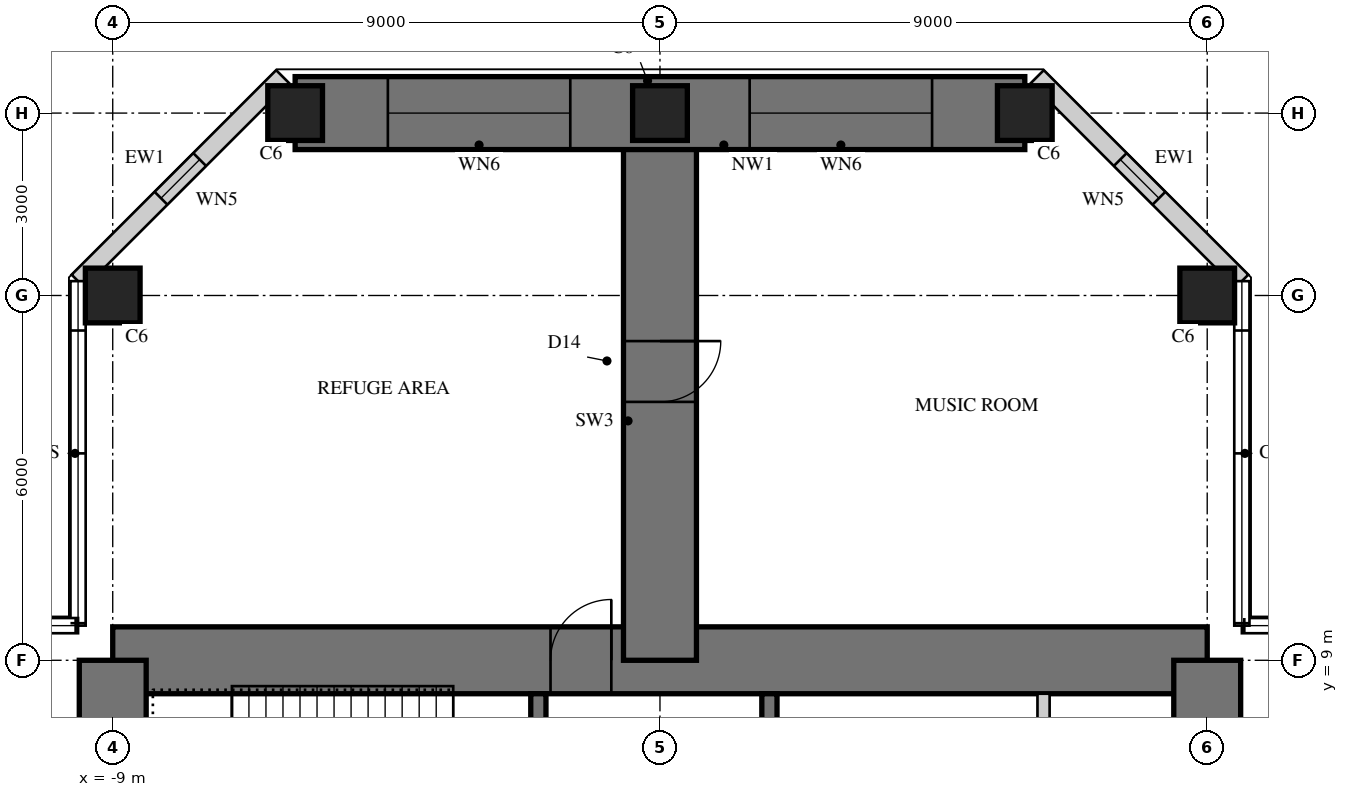
"""IFC4 building model, lengths in metres.
Left out: names, types, materials, properties, quantities, classifications, styles, units other than length and angle.
Written with IfcOpenShell. Run it as: python <this file> out.ifc"""

import sys

from ifc_helpers import new_model, si_unit, direction, frame, frame_2d, origin, origin_2d, place, context, subcontext, project, spatial, rectangle, hollow_rectangle, extrude, element, fill, save


model = new_model("IFC4")
c1 = context("Model", 3, precision=1e-05, world=origin(), true_north=direction((0.0, 1.0)))
c2 = subcontext(c1, "Body", "Model", "MODEL_VIEW")
j1 = project(units=[si_unit("LENGTHUNIT", "METRE"), si_unit("PLANEANGLEUNIT", "RADIAN")], contexts=[c1])
p1 = place(None, origin())
s1 = spatial("IfcSite", under=j1, at=p1, CompositionType="ELEMENT")
p2 = place(p1, origin())
s2 = spatial("IfcBuilding", under=s1, at=p2, CompositionType="ELEMENT")
p3 = place(p2, frame((0.0, 0.0, 217.1)))
s3 = spatial("IfcBuildingStorey", under=s2, at=p3, CompositionType="ELEMENT", Elevation=217.1)
p4 = place(p3, frame((9.0, 9.0, 0.0), z_axis=(0.0, 0.0, 1.0), x_axis=(-1.0, 0.0, 0.0)))
e1 = element("IfcWall", 1, at=p4, inside=s3, PredefinedType="SHEAR", context=c2, shape_type="SweptSolid", body=[
    extrude(rectangle(XDim=18.0, YDim=1.1, at=frame_2d((9.0, 0.0))), origin(), (0.0, 0.0, 1.0), 5.0),
])
p5 = place(p4, frame((9.8, 0.0, 0.0)))
e2 = element("IfcOpeningElement", 2, at=p5, cuts=e1, PredefinedType="OPENING", context=c2, shape_type="SweptSolid", body=[
    extrude(rectangle(XDim=1.0, YDim=2.4, at=frame_2d((0.5, 1.2))), frame((0.0, 0.56, 0.0), z_axis=(0.0, -1.0, 0.0), x_axis=(1.0, 0.0, 0.0)), (0.0, 0.0, 1.0), 1.12),
])
p6 = place(p3, frame((9.0, -9.0, 0.0), z_axis=(0.0, 0.0, 1.0), x_axis=(0.0, 1.0, 0.0)))
e3 = element("IfcWall", 3, at=p6, inside=s3, PredefinedType="SHEAR", context=c2, shape_type="SweptSolid", body=[
    extrude(rectangle(XDim=18.0, YDim=1.1, at=frame_2d((9.0, 0.0))), origin(), (0.0, 0.0, 1.0), 5.0),
])
p7 = place(p6, frame((9.8, 0.0, 0.0)))
e4 = element("IfcOpeningElement", 4, at=p7, cuts=e3, PredefinedType="OPENING", context=c2, shape_type="SweptSolid", body=[
    extrude(rectangle(XDim=1.0, YDim=2.4, at=frame_2d((0.5, 1.2))), frame((0.0, 0.56, 0.0), z_axis=(0.0, -1.0, 0.0), x_axis=(1.0, 0.0, 0.0)), (0.0, 0.0, 1.0), 1.12),
])
p8 = place(p3, frame((-9.0, 9.0, 0.0), z_axis=(0.0, 0.0, 1.0), x_axis=(0.0, -1.0, 0.0)))
e5 = element("IfcWall", 5, at=p8, inside=s3, PredefinedType="SHEAR", context=c2, shape_type="SweptSolid", body=[
    extrude(rectangle(XDim=18.0, YDim=1.1, at=frame_2d((9.0, 0.0))), origin(), (0.0, 0.0, 1.0), 5.0),
])
p9 = place(p8, frame((9.8, 0.0, 0.0)))
e6 = element("IfcOpeningElement", 6, at=p9, cuts=e5, PredefinedType="OPENING", context=c2, shape_type="SweptSolid", body=[
    extrude(rectangle(XDim=1.0, YDim=2.4, at=frame_2d((0.5, 1.2))), frame((0.0, 0.56, 0.0), z_axis=(0.0, -1.0, 0.0), x_axis=(1.0, 0.0, 0.0)), (0.0, 0.0, 1.0), 1.12),
])
p10 = place(p3, frame((1.8, 1.875, 0.0), z_axis=(0.0, 0.0, 1.0), x_axis=(0.0, 1.0, 0.0)))
e7 = element("IfcWall", 7, at=p10, inside=s3, PredefinedType="SHEAR", context=c2, shape_type="SweptSolid", body=[
    extrude(rectangle(XDim=6.575, YDim=0.25, at=frame_2d((3.288, 0.0))), origin(), (0.0, 0.0, 1.0), 5.0),
])
p11 = place(p10, frame((1.875, 0.0, 0.0)))
e8 = element("IfcOpeningElement", 8, at=p11, cuts=e7, PredefinedType="OPENING", context=c2, shape_type="SweptSolid", body=[
    extrude(rectangle(XDim=1.6, YDim=2.4, at=frame_2d((0.8, 1.2))), frame((0.0, 0.135, 0.0), z_axis=(0.0, -1.0, 0.0), x_axis=(1.0, 0.0, 0.0)), (0.0, 0.0, 1.0), 0.27),
])
p12 = place(p3, frame((6.308, 5.975, 0.0), z_axis=(0.0, 0.0, 1.0), x_axis=(0.0, 1.0, 0.0)))
e9 = element("IfcWall", 9, at=p12, inside=s3, PredefinedType="PARTITIONING", context=c2, shape_type="SweptSolid", body=[
    extrude(rectangle(XDim=2.475, YDim=0.2, at=frame_2d((1.237, 0.0))), origin(), (0.0, 0.0, 1.0), 5.0),
])
p13 = place(p3, frame((-2.0, 1.675, 0.0), z_axis=(0.0, 0.0, 1.0), x_axis=(0.0, 1.0, 0.0)))
e10 = element("IfcWall", 10, at=p13, inside=s3, PredefinedType="SHEAR", context=c2, shape_type="SweptSolid", body=[
    extrude(rectangle(XDim=6.775, YDim=0.25, at=frame_2d((3.387, 0.0))), origin(), (0.0, 0.0, 1.0), 5.0),
])
p14 = place(p13, frame((0.725, 0.0, 0.0)))
e11 = element("IfcOpeningElement", 11, at=p14, cuts=e10, PredefinedType="OPENING", context=c2, shape_type="SweptSolid", body=[
    extrude(rectangle(XDim=1.0, YDim=2.1, at=frame_2d((0.5, 1.05))), frame((0.0, 0.135, 0.0), z_axis=(0.0, -1.0, 0.0), x_axis=(1.0, 0.0, 0.0)), (0.0, 0.0, 1.0), 0.27),
])
p15 = place(p3, frame((0.0, 9.0, 0.0), z_axis=(0.0, 0.0, 1.0), x_axis=(0.0, 1.0, 0.0)))
e12 = element("IfcWall", 12, at=p15, inside=s3, PredefinedType="SHEAR", context=c2, shape_type="SweptSolid", body=[
    extrude(rectangle(XDim=9.0, YDim=1.2, at=frame_2d((4.5, 0.0))), origin(), (0.0, 0.0, 1.0), 5.0),
])
p16 = place(p15, frame((4.25, 0.0, 0.0)))
e13 = element("IfcOpeningElement", 13, at=p16, cuts=e12, PredefinedType="OPENING", context=c2, shape_type="SweptSolid", body=[
    extrude(rectangle(XDim=1.0, YDim=2.2, at=frame_2d((0.5, 1.1))), frame((0.0, 0.61, 0.0), z_axis=(0.0, -1.0, 0.0), x_axis=(1.0, 0.0, 0.0)), (0.0, 0.0, 1.0), 1.22),
])
p17 = place(p3, frame((6.0, 18.0, 0.0), z_axis=(0.0, 0.0, 1.0), x_axis=(-1.0, 0.0, 0.0)))
e14 = element("IfcWall", 14, at=p17, inside=s3, PredefinedType="SHEAR", context=c2, shape_type="SweptSolid", body=[
    extrude(rectangle(XDim=12.0, YDim=1.2, at=frame_2d((6.0, 0.0))), origin(), (0.0, 0.0, 1.0), 5.0),
])
p18 = place(p17, frame((1.525, 0.0, 0.6)))
e15 = element("IfcOpeningElement", 15, at=p18, cuts=e14, PredefinedType="OPENING", context=c2, shape_type="SweptSolid", body=[
    extrude(rectangle(XDim=3.0, YDim=2.4, at=frame_2d((1.5, 1.2))), frame((0.0, 0.61, 0.0), z_axis=(0.0, -1.0, 0.0), x_axis=(1.0, 0.0, 0.0)), (0.0, 0.0, 1.0), 1.22),
])
p19 = place(p17, frame((7.475, 0.0, 0.6)))
e16 = element("IfcOpeningElement", 16, at=p19, cuts=e14, PredefinedType="OPENING", context=c2, shape_type="SweptSolid", body=[
    extrude(rectangle(XDim=3.0, YDim=2.4, at=frame_2d((1.5, 1.2))), frame((0.0, 0.61, 0.0), z_axis=(0.0, -1.0, 0.0), x_axis=(1.0, 0.0, 0.0)), (0.0, 0.0, 1.0), 1.22),
])
for number, where, z_axis, x_axis in (
    (17, (9.0, 15.0, 0.0), (0.0, 0.0, 1.0), (1.0, 0.0, 0.0)),
    (18, (-9.0, 15.0, 0.0), (0.0, 0.0, 1.0), (1.0, 0.0, 0.0)),
    (19, (6.0, 18.0, 0.0), (0.0, 0.0, 1.0), (1.0, 0.0, 0.0)),
    (20, (0.0, 18.0, 0.0), (0.0, 0.0, 1.0), (1.0, 0.0, 0.0)),
    (21, (-6.0, 18.0, 0.0), (0.0, 0.0, 1.0), (1.0, 0.0, 0.0)),
):
    element("IfcColumn", number, at=place(p3, frame(where, z_axis=z_axis, x_axis=x_axis)), inside=s3, PredefinedType="COLUMN", context=c2, shape_type="SweptSolid", body=[
        extrude(rectangle(XDim=0.9, YDim=0.9, at=origin_2d()), origin(), (0.0, 0.0, 1.0), 5.0),
    ])
p20 = place(p3, frame((9.57, 15.236, 0.0), z_axis=(0.0, 0.0, 1.0), x_axis=(-0.707106781187, 0.707106781187, 0.0)))
e22 = element("IfcWall", 22, at=p20, inside=s3, PredefinedType="SOLIDWALL", context=c2, shape_type="SweptSolid", body=[
    extrude(rectangle(XDim=4.757, YDim=0.3, at=frame_2d((2.379, 0.0))), origin(), (0.0, 0.0, 1.0), 4.82),
])
p21 = place(p20, frame((1.929, 0.0, 0.3)))
e23 = element("IfcOpeningElement", 23, at=p21, cuts=e22, PredefinedType="OPENING", context=c2, shape_type="SweptSolid", body=[
    extrude(rectangle(XDim=0.9, YDim=2.4, at=frame_2d((0.45, 1.2))), frame((0.0, 0.16, 0.0), z_axis=(0.0, -1.0, 0.0), x_axis=(1.0, 0.0, 0.0)), (0.0, 0.0, 1.0), 0.32),
])
p22 = place(p3, frame((-6.206, 18.6, 0.0), z_axis=(0.0, 0.0, 1.0), x_axis=(-0.707106781187, -0.707106781187, 0.0)))
e24 = element("IfcWall", 24, at=p22, inside=s3, PredefinedType="SOLIDWALL", context=c2, shape_type="SweptSolid", body=[
    extrude(rectangle(XDim=4.757, YDim=0.3, at=frame_2d((2.379, 0.0))), origin(), (0.0, 0.0, 1.0), 4.82),
])
p23 = place(p22, frame((1.929, 0.0, 0.3)))
e25 = element("IfcOpeningElement", 25, at=p23, cuts=e24, PredefinedType="OPENING", context=c2, shape_type="SweptSolid", body=[
    extrude(rectangle(XDim=0.9, YDim=2.4, at=frame_2d((0.45, 1.2))), frame((0.0, 0.16, 0.0), z_axis=(0.0, -1.0, 0.0), x_axis=(1.0, 0.0, 0.0)), (0.0, 0.0, 1.0), 0.32),
])
p24 = place(p21, origin())
e26 = element("IfcWindow", 26, at=p24, inside=s3, PartitioningType="SINGLE_PANEL", PredefinedType="WINDOW", context=c2, shape_type="SweptSolid", body=[
    extrude(hollow_rectangle(XDim=0.9, YDim=2.4, WallThickness=0.06, at=frame_2d((0.45, 1.2))), frame((0.0, 0.03, 0.0), z_axis=(0.0, -1.0, 0.0), x_axis=(1.0, 0.0, 0.0)), (0.0, 0.0, 1.0), 0.06),
    extrude(rectangle(XDim=0.779, YDim=2.279, at=frame_2d((0.45, 1.2))), frame((0.0, 0.03, 0.0), z_axis=(0.0, -1.0, 0.0), x_axis=(1.0, 0.0, 0.0)), (0.0, 0.0, 1.0), 0.06),
])
fill(e23, e26)
p25 = place(p18, origin())
e27 = element("IfcWindow", 27, at=p25, inside=s3, PartitioningType="SINGLE_PANEL", PredefinedType="WINDOW", context=c2, shape_type="SweptSolid", body=[
    extrude(hollow_rectangle(XDim=3.0, YDim=2.4, WallThickness=0.06, at=frame_2d((1.5, 1.2))), frame((0.0, 0.03, 0.0), z_axis=(0.0, -1.0, 0.0), x_axis=(1.0, 0.0, 0.0)), (0.0, 0.0, 1.0), 0.06),
    extrude(rectangle(XDim=2.879, YDim=2.279, at=frame_2d((1.5, 1.2))), frame((0.0, 0.03, 0.0), z_axis=(0.0, -1.0, 0.0), x_axis=(1.0, 0.0, 0.0)), (0.0, 0.0, 1.0), 0.06),
])
fill(e15, e27)
p26 = place(p19, origin())
e28 = element("IfcWindow", 28, at=p26, inside=s3, PartitioningType="SINGLE_PANEL", PredefinedType="WINDOW", context=c2, shape_type="SweptSolid", body=[
    extrude(hollow_rectangle(XDim=3.0, YDim=2.4, WallThickness=0.06, at=frame_2d((1.5, 1.2))), frame((0.0, 0.03, 0.0), z_axis=(0.0, -1.0, 0.0), x_axis=(1.0, 0.0, 0.0)), (0.0, 0.0, 1.0), 0.06),
    extrude(rectangle(XDim=2.879, YDim=2.279, at=frame_2d((1.5, 1.2))), frame((0.0, 0.03, 0.0), z_axis=(0.0, -1.0, 0.0), x_axis=(1.0, 0.0, 0.0)), (0.0, 0.0, 1.0), 0.06),
])
fill(e16, e28)
p27 = place(p23, origin())
e29 = element("IfcWindow", 29, at=p27, inside=s3, PartitioningType="SINGLE_PANEL", PredefinedType="WINDOW", context=c2, shape_type="SweptSolid", body=[
    extrude(hollow_rectangle(XDim=0.9, YDim=2.4, WallThickness=0.06, at=frame_2d((0.45, 1.2))), frame((0.0, 0.03, 0.0), z_axis=(0.0, -1.0, 0.0), x_axis=(1.0, 0.0, 0.0)), (0.0, 0.0, 1.0), 0.06),
    extrude(rectangle(XDim=0.779, YDim=2.279, at=frame_2d((0.45, 1.2))), frame((0.0, 0.03, 0.0), z_axis=(0.0, -1.0, 0.0), x_axis=(1.0, 0.0, 0.0)), (0.0, 0.0, 1.0), 0.06),
])
fill(e25, e29)
p28 = place(p16, frame((1.0, 0.0, 0.0), z_axis=(0.0, 0.0, 1.0), x_axis=(-1.0, 0.0, 0.0)))
e30 = element("IfcDoor", 30, at=p28, inside=s3, OperationType="SINGLE_SWING_LEFT", PredefinedType="DOOR", context=c2, shape_type="SweptSolid", body=[
    extrude(rectangle(XDim=1.0, YDim=2.2, at=frame_2d((0.5, 1.1))), frame((0.0, 0.025, 0.0), z_axis=(0.0, -1.0, 0.0), x_axis=(1.0, 0.0, 0.0)), (0.0, 0.0, 1.0), 0.05),
])
fill(e13, e30)
p29 = place(p5, frame((1.0, 0.0, 0.0), z_axis=(0.0, 0.0, 1.0), x_axis=(-1.0, 0.0, 0.0)))
e31 = element("IfcDoor", 31, at=p29, inside=s3, OperationType="SINGLE_SWING_RIGHT", PredefinedType="DOOR", context=c2, shape_type="SweptSolid", body=[
    extrude(rectangle(XDim=1.0, YDim=2.4, at=frame_2d((0.5, 1.2))), frame((0.0, -0.005, 0.0), z_axis=(0.0, -1.0, 0.0), x_axis=(1.0, 0.0, 0.0)), (0.0, 0.0, 1.0), 0.05),
])
fill(e2, e31)
save(model, sys.argv[1])
